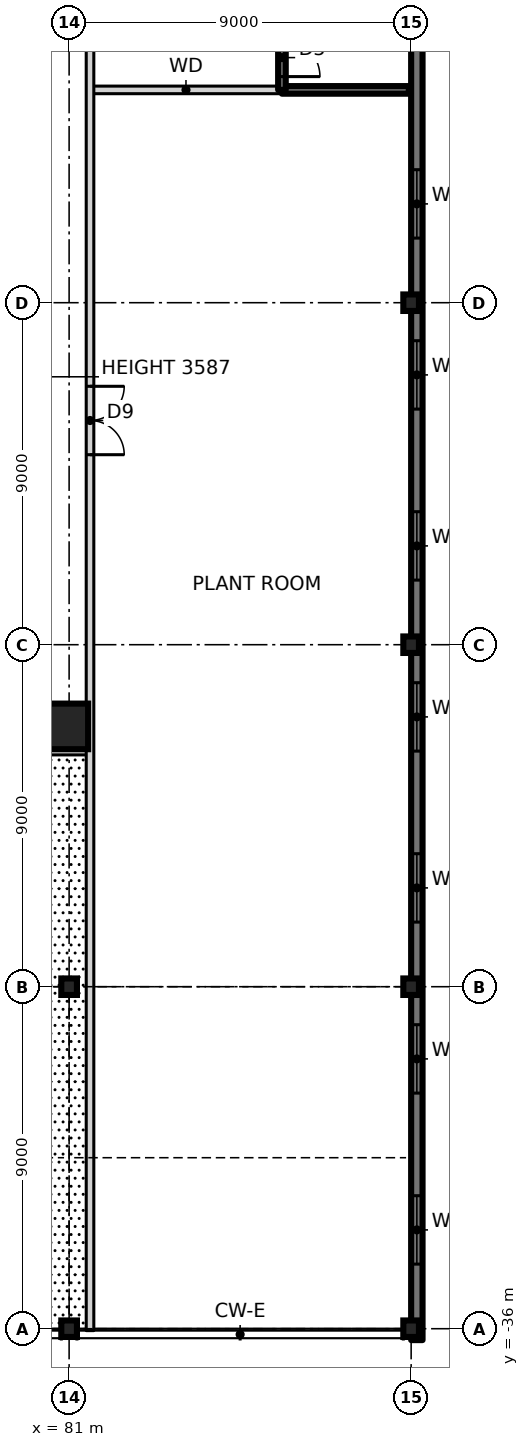
"""IFC4 building model, lengths in metres.
Left out: names, types, materials, properties, quantities, classifications, styles, units other than length and angle.
Written with IfcOpenShell. Run it as: python <this file> out.ifc"""

import sys

from ifc_helpers import new_model, si_unit, direction, frame, frame_2d, origin, origin_2d, place, context, subcontext, project, spatial, rectangle, hollow_rectangle, i_section, extrude, element, fill, save


model = new_model("IFC4")
c1 = context("Model", 3, precision=1e-05, world=origin(), true_north=direction((0.0, 1.0)))
c2 = subcontext(c1, "Body", "Model", "MODEL_VIEW")
j1 = project(units=[si_unit("LENGTHUNIT", "METRE"), si_unit("PLANEANGLEUNIT", "RADIAN")], contexts=[c1])
p1 = place(None, origin())
s1 = spatial("IfcSite", under=j1, at=p1, CompositionType="ELEMENT")
p2 = place(p1, origin())
s2 = spatial("IfcBuilding", under=s1, at=p2, CompositionType="ELEMENT")
p3 = place(p2, frame((0.0, 0.0, 10.5)))
s3 = spatial("IfcBuildingStorey", under=s2, at=p3, CompositionType="ELEMENT", Elevation=10.5)
p4 = place(p3, frame((80.9, -20.15, 0.0), z_axis=(0.0, 0.0, 1.0), x_axis=(1.0, 0.0, 0.0)))
e1 = element("IfcColumn", 1, at=p4, inside=s3, PredefinedType="COLUMN", context=c2, shape_type="SweptSolid", body=[
    extrude(hollow_rectangle(XDim=1.2, YDim=1.2, WallThickness=0.07, at=origin_2d()), origin(), (0.0, 0.0, 1.0), 4.5),
])
for number, where, z_axis, x_axis in (
    (2, (81.0, -36.0, 0.0), (0.0, 0.0, 1.0), (1.0, 0.0, 0.0)),
    (3, (81.0, -27.0, 0.0), (0.0, 0.0, 1.0), (1.0, 0.0, 0.0)),
    (4, (90.0, -36.0, 0.0), (0.0, 0.0, 1.0), (1.0, 0.0, 0.0)),
    (5, (90.0, -27.0, 0.0), (0.0, 0.0, 1.0), (1.0, 0.0, 0.0)),
    (6, (90.0, -18.0, 0.0), (0.0, 0.0, 1.0), (1.0, 0.0, 0.0)),
    (7, (90.0, -9.0, 0.0), (0.0, 0.0, 1.0), (1.0, 0.0, 0.0)),
):
    element("IfcColumn", number, at=place(p3, frame(where, z_axis=z_axis, x_axis=x_axis)), inside=s3, PredefinedType="COLUMN", context=c2, shape_type="SweptSolid", body=[
        extrude(i_section(OverallWidth=0.411, OverallDepth=0.434, WebThickness=0.036, FlangeThickness=0.057, at=origin_2d()), origin(), (0.0, 0.0, 1.0), 4.5),
    ])
p5 = place(p3, frame((90.15, -36.3, -0.25), z_axis=(0.0, 0.0, 1.0), x_axis=(0.0, 1.0, 0.0)))
e8 = element("IfcWall", 8, at=p5, inside=s3, PredefinedType="SOLIDWALL", context=c2, shape_type="SweptSolid", body=[
    extrude(rectangle(XDim=72.6, YDim=0.3, at=frame_2d((36.3, 0.0))), origin(), (0.0, 0.0, 1.0), 4.75),
])
p6 = place(p5, frame((2.0, 0.0, 1.15)))
e9 = element("IfcOpeningElement", 9, at=p6, cuts=e8, PredefinedType="OPENING", context=c2, shape_type="SweptSolid", body=[
    extrude(rectangle(XDim=1.8, YDim=2.4, at=frame_2d((0.9, 1.2))), frame((0.0, 0.16, 0.0), z_axis=(0.0, -1.0, 0.0), x_axis=(1.0, 0.0, 0.0)), (0.0, 0.0, 1.0), 0.32),
])
p7 = place(p5, frame((6.5, 0.0, 1.15)))
e10 = element("IfcOpeningElement", 10, at=p7, cuts=e8, PredefinedType="OPENING", context=c2, shape_type="SweptSolid", body=[
    extrude(rectangle(XDim=1.8, YDim=2.4, at=frame_2d((0.9, 1.2))), frame((0.0, 0.16, 0.0), z_axis=(0.0, -1.0, 0.0), x_axis=(1.0, 0.0, 0.0)), (0.0, 0.0, 1.0), 0.32),
])
p8 = place(p5, frame((11.0, 0.0, 1.15)))
e11 = element("IfcOpeningElement", 11, at=p8, cuts=e8, PredefinedType="OPENING", context=c2, shape_type="SweptSolid", body=[
    extrude(rectangle(XDim=1.8, YDim=2.4, at=frame_2d((0.9, 1.2))), frame((0.0, 0.16, 0.0), z_axis=(0.0, -1.0, 0.0), x_axis=(1.0, 0.0, 0.0)), (0.0, 0.0, 1.0), 0.32),
])
p9 = place(p5, frame((15.5, 0.0, 1.15)))
e12 = element("IfcOpeningElement", 12, at=p9, cuts=e8, PredefinedType="OPENING", context=c2, shape_type="SweptSolid", body=[
    extrude(rectangle(XDim=1.8, YDim=2.4, at=frame_2d((0.9, 1.2))), frame((0.0, 0.16, 0.0), z_axis=(0.0, -1.0, 0.0), x_axis=(1.0, 0.0, 0.0)), (0.0, 0.0, 1.0), 0.32),
])
p10 = place(p5, frame((20.0, 0.0, 1.15)))
e13 = element("IfcOpeningElement", 13, at=p10, cuts=e8, PredefinedType="OPENING", context=c2, shape_type="SweptSolid", body=[
    extrude(rectangle(XDim=1.8, YDim=2.4, at=frame_2d((0.9, 1.2))), frame((0.0, 0.16, 0.0), z_axis=(0.0, -1.0, 0.0), x_axis=(1.0, 0.0, 0.0)), (0.0, 0.0, 1.0), 0.32),
])
p11 = place(p5, frame((24.5, 0.0, 1.15)))
e14 = element("IfcOpeningElement", 14, at=p11, cuts=e8, PredefinedType="OPENING", context=c2, shape_type="SweptSolid", body=[
    extrude(rectangle(XDim=1.8, YDim=2.4, at=frame_2d((0.9, 1.2))), frame((0.0, 0.16, 0.0), z_axis=(0.0, -1.0, 0.0), x_axis=(1.0, 0.0, 0.0)), (0.0, 0.0, 1.0), 0.32),
])
p12 = place(p5, frame((29.0, 0.0, 1.15)))
e15 = element("IfcOpeningElement", 15, at=p12, cuts=e8, PredefinedType="OPENING", context=c2, shape_type="SweptSolid", body=[
    extrude(rectangle(XDim=1.8, YDim=2.4, at=frame_2d((0.9, 1.2))), frame((0.0, 0.16, 0.0), z_axis=(0.0, -1.0, 0.0), x_axis=(1.0, 0.0, 0.0)), (0.0, 0.0, 1.0), 0.32),
])
p13 = place(p5, frame((42.5, 0.0, 1.15)))
e16 = element("IfcOpeningElement", 16, at=p13, cuts=e8, PredefinedType="OPENING", context=c2, shape_type="SweptSolid", body=[
    extrude(rectangle(XDim=1.8, YDim=2.4, at=frame_2d((0.9, 1.2))), frame((0.0, 0.16, 0.0), z_axis=(0.0, -1.0, 0.0), x_axis=(1.0, 0.0, 0.0)), (0.0, 0.0, 1.0), 0.32),
])
p14 = place(p5, frame((47.0, 0.0, 1.15)))
e17 = element("IfcOpeningElement", 17, at=p14, cuts=e8, PredefinedType="OPENING", context=c2, shape_type="SweptSolid", body=[
    extrude(rectangle(XDim=1.8, YDim=2.4, at=frame_2d((0.9, 1.2))), frame((0.0, 0.16, 0.0), z_axis=(0.0, -1.0, 0.0), x_axis=(1.0, 0.0, 0.0)), (0.0, 0.0, 1.0), 0.32),
])
p15 = place(p5, frame((51.5, 0.0, 1.15)))
e18 = element("IfcOpeningElement", 18, at=p15, cuts=e8, PredefinedType="OPENING", context=c2, shape_type="SweptSolid", body=[
    extrude(rectangle(XDim=1.8, YDim=2.4, at=frame_2d((0.9, 1.2))), frame((0.0, 0.16, 0.0), z_axis=(0.0, -1.0, 0.0), x_axis=(1.0, 0.0, 0.0)), (0.0, 0.0, 1.0), 0.32),
])
p16 = place(p5, frame((56.0, 0.0, 1.15)))
e19 = element("IfcOpeningElement", 19, at=p16, cuts=e8, PredefinedType="OPENING", context=c2, shape_type="SweptSolid", body=[
    extrude(rectangle(XDim=1.8, YDim=2.4, at=frame_2d((0.9, 1.2))), frame((0.0, 0.16, 0.0), z_axis=(0.0, -1.0, 0.0), x_axis=(1.0, 0.0, 0.0)), (0.0, 0.0, 1.0), 0.32),
])
p17 = place(p5, frame((60.5, 0.0, 1.15)))
e20 = element("IfcOpeningElement", 20, at=p17, cuts=e8, PredefinedType="OPENING", context=c2, shape_type="SweptSolid", body=[
    extrude(rectangle(XDim=1.8, YDim=2.4, at=frame_2d((0.9, 1.2))), frame((0.0, 0.16, 0.0), z_axis=(0.0, -1.0, 0.0), x_axis=(1.0, 0.0, 0.0)), (0.0, 0.0, 1.0), 0.32),
])
p18 = place(p5, frame((65.0, 0.0, 1.15)))
e21 = element("IfcOpeningElement", 21, at=p18, cuts=e8, PredefinedType="OPENING", context=c2, shape_type="SweptSolid", body=[
    extrude(rectangle(XDim=1.8, YDim=2.4, at=frame_2d((0.9, 1.2))), frame((0.0, 0.16, 0.0), z_axis=(0.0, -1.0, 0.0), x_axis=(1.0, 0.0, 0.0)), (0.0, 0.0, 1.0), 0.32),
])
p19 = place(p5, frame((69.5, 0.0, 1.15)))
e22 = element("IfcOpeningElement", 22, at=p19, cuts=e8, PredefinedType="OPENING", context=c2, shape_type="SweptSolid", body=[
    extrude(rectangle(XDim=1.8, YDim=2.4, at=frame_2d((0.9, 1.2))), frame((0.0, 0.16, 0.0), z_axis=(0.0, -1.0, 0.0), x_axis=(1.0, 0.0, 0.0)), (0.0, 0.0, 1.0), 0.32),
])
p20 = place(p3, frame((44.45, -20.8, 0.0), z_axis=(0.0, 0.0, 1.0), x_axis=(1.0, 0.0, 0.0)))
e23 = element("IfcWall", 23, at=p20, inside=s3, PredefinedType="SOLIDWALL", context=c2, shape_type="SweptSolid", body=[
    extrude(rectangle(XDim=37.1, YDim=0.2, at=frame_2d((18.55, 0.0))), origin(), (0.0, 0.0, 1.0), 4.25),
])
p21 = place(p20, frame((3.325, 0.0, 0.0)))
e24 = element("IfcOpeningElement", 24, at=p21, cuts=e23, PredefinedType="OPENING", context=c2, shape_type="SweptSolid", body=[
    extrude(rectangle(XDim=1.8, YDim=2.1, at=frame_2d((0.9, 1.05))), frame((0.0, 0.11, 0.0), z_axis=(0.0, -1.0, 0.0), x_axis=(1.0, 0.0, 0.0)), (0.0, 0.0, 1.0), 0.22),
])
p22 = place(p20, frame((26.625, 0.0, 0.0)))
e25 = element("IfcOpeningElement", 25, at=p22, cuts=e23, PredefinedType="OPENING", context=c2, shape_type="SweptSolid", body=[
    extrude(rectangle(XDim=1.8, YDim=2.1, at=frame_2d((0.9, 1.05))), frame((0.0, 0.11, 0.0), z_axis=(0.0, -1.0, 0.0), x_axis=(1.0, 0.0, 0.0)), (0.0, 0.0, 1.0), 0.22),
])
p23 = place(p20, frame((8.65, 0.0, 0.0)))
e26 = element("IfcOpeningElement", 26, at=p23, cuts=e23, PredefinedType="OPENING", context=c2, shape_type="SweptSolid", body=[
    extrude(rectangle(XDim=1.8, YDim=2.1, at=frame_2d((0.9, 1.05))), frame((0.0, 0.11, 0.0), z_axis=(0.0, -1.0, 0.0), x_axis=(1.0, 0.0, 0.0)), (0.0, 0.0, 1.0), 0.22),
])
p24 = place(p3, frame((81.55, -3.4, 0.0), z_axis=(0.0, 0.0, 1.0), x_axis=(1.0, 0.0, 0.0)))
e27 = element("IfcWall", 27, at=p24, inside=s3, PredefinedType="SOLIDWALL", context=c2, shape_type="SweptSolid", body=[
    extrude(rectangle(XDim=5.05, YDim=0.2, at=frame_2d((2.525, 0.0))), origin(), (0.0, 0.0, 1.0), 4.25),
])
p25 = place(p3, frame((86.6, -3.4, 0.0), z_axis=(0.0, 0.0, 1.0), x_axis=(1.0, 0.0, 0.0)))
e28 = element("IfcWall", 28, at=p25, inside=s3, PredefinedType="SOLIDWALL", context=c2, shape_type="SweptSolid", body=[
    extrude(rectangle(XDim=3.34, YDim=0.2, at=frame_2d((1.67, 0.0))), origin(), (0.0, 0.0, 1.0), 4.5),
])
p26 = place(p3, frame((86.6, -3.4, 0.0), z_axis=(0.0, 0.0, 1.0), x_axis=(0.0, 1.0, 0.0)))
e29 = element("IfcWall", 29, at=p26, inside=s3, PredefinedType="SOLIDWALL", context=c2, shape_type="SweptSolid", body=[
    extrude(rectangle(XDim=7.4, YDim=0.2, at=frame_2d((3.7, 0.0))), origin(), (0.0, 0.0, 1.0), 4.5),
])
p27 = place(p26, frame((0.35, 0.0, 0.0)))
e30 = element("IfcOpeningElement", 30, at=p27, cuts=e29, PredefinedType="OPENING", context=c2, shape_type="SweptSolid", body=[
    extrude(rectangle(XDim=1.0, YDim=2.1, at=frame_2d((0.5, 1.05))), frame((0.0, 0.11, 0.0), z_axis=(0.0, -1.0, 0.0), x_axis=(1.0, 0.0, 0.0)), (0.0, 0.0, 1.0), 0.22),
])
p28 = place(p3, frame((81.55, -36.05, 0.0), z_axis=(0.0, 0.0, 1.0), x_axis=(0.0, 1.0, 0.0)))
e31 = element("IfcWall", 31, at=p28, inside=s3, PredefinedType="SOLIDWALL", context=c2, shape_type="SweptSolid", body=[
    extrude(rectangle(XDim=72.1, YDim=0.2, at=frame_2d((36.05, 0.0))), origin(), (0.0, 0.0, 1.0), 4.25),
])
p29 = place(p28, frame((66.65, 0.0, 0.0)))
e32 = element("IfcOpeningElement", 32, at=p29, cuts=e31, PredefinedType="OPENING", context=c2, shape_type="SweptSolid", body=[
    extrude(rectangle(XDim=1.8, YDim=2.1, at=frame_2d((0.9, 1.05))), frame((0.0, 0.11, 0.0), z_axis=(0.0, -1.0, 0.0), x_axis=(1.0, 0.0, 0.0)), (0.0, 0.0, 1.0), 0.22),
])
p30 = place(p28, frame((23.05, 0.0, 0.0)))
e33 = element("IfcOpeningElement", 33, at=p30, cuts=e31, PredefinedType="OPENING", context=c2, shape_type="SweptSolid", body=[
    extrude(rectangle(XDim=1.8, YDim=2.1, at=frame_2d((0.9, 1.05))), frame((0.0, 0.11, 0.0), z_axis=(0.0, -1.0, 0.0), x_axis=(1.0, 0.0, 0.0)), (0.0, 0.0, 1.0), 0.22),
])
p31 = place(p28, frame((35.45, 0.0, 0.0)))
e34 = element("IfcOpeningElement", 34, at=p31, cuts=e31, PredefinedType="OPENING", context=c2, shape_type="SweptSolid", body=[
    extrude(rectangle(XDim=1.8, YDim=2.1, at=frame_2d((0.9, 1.05))), frame((0.0, 0.11, 0.0), z_axis=(0.0, -1.0, 0.0), x_axis=(1.0, 0.0, 0.0)), (0.0, 0.0, 1.0), 0.22),
])
p32 = place(p28, frame((47.55, 0.0, 0.0)))
e35 = element("IfcOpeningElement", 35, at=p32, cuts=e31, PredefinedType="OPENING", context=c2, shape_type="SweptSolid", body=[
    extrude(rectangle(XDim=1.8, YDim=2.1, at=frame_2d((0.9, 1.05))), frame((0.0, 0.11, 0.0), z_axis=(0.0, -1.0, 0.0), x_axis=(1.0, 0.0, 0.0)), (0.0, 0.0, 1.0), 0.22),
])
p33 = place(p6, origin())
e36 = element("IfcWindow", 36, at=p33, inside=s3, PartitioningType="SINGLE_PANEL", PredefinedType="WINDOW", context=c2, shape_type="SweptSolid", body=[
    extrude(rectangle(XDim=1.8, YDim=2.4, at=frame_2d((0.9, 1.2))), frame((0.0, 0.03, 0.0), z_axis=(0.0, -1.0, 0.0), x_axis=(1.0, 0.0, 0.0)), (0.0, 0.0, 1.0), 0.06),
])
fill(e9, e36)
p34 = place(p7, origin())
e37 = element("IfcWindow", 37, at=p34, inside=s3, PartitioningType="SINGLE_PANEL", PredefinedType="WINDOW", context=c2, shape_type="SweptSolid", body=[
    extrude(rectangle(XDim=1.8, YDim=2.4, at=frame_2d((0.9, 1.2))), frame((0.0, 0.03, 0.0), z_axis=(0.0, -1.0, 0.0), x_axis=(1.0, 0.0, 0.0)), (0.0, 0.0, 1.0), 0.06),
])
fill(e10, e37)
p35 = place(p8, origin())
e38 = element("IfcWindow", 38, at=p35, inside=s3, PartitioningType="SINGLE_PANEL", PredefinedType="WINDOW", context=c2, shape_type="SweptSolid", body=[
    extrude(rectangle(XDim=1.8, YDim=2.4, at=frame_2d((0.9, 1.2))), frame((0.0, 0.03, 0.0), z_axis=(0.0, -1.0, 0.0), x_axis=(1.0, 0.0, 0.0)), (0.0, 0.0, 1.0), 0.06),
])
fill(e11, e38)
p36 = place(p9, origin())
e39 = element("IfcWindow", 39, at=p36, inside=s3, PartitioningType="SINGLE_PANEL", PredefinedType="WINDOW", context=c2, shape_type="SweptSolid", body=[
    extrude(rectangle(XDim=1.8, YDim=2.4, at=frame_2d((0.9, 1.2))), frame((0.0, 0.03, 0.0), z_axis=(0.0, -1.0, 0.0), x_axis=(1.0, 0.0, 0.0)), (0.0, 0.0, 1.0), 0.06),
])
fill(e12, e39)
p37 = place(p10, origin())
e40 = element("IfcWindow", 40, at=p37, inside=s3, PartitioningType="SINGLE_PANEL", PredefinedType="WINDOW", context=c2, shape_type="SweptSolid", body=[
    extrude(rectangle(XDim=1.8, YDim=2.4, at=frame_2d((0.9, 1.2))), frame((0.0, 0.03, 0.0), z_axis=(0.0, -1.0, 0.0), x_axis=(1.0, 0.0, 0.0)), (0.0, 0.0, 1.0), 0.06),
])
fill(e13, e40)
p38 = place(p11, origin())
e41 = element("IfcWindow", 41, at=p38, inside=s3, PartitioningType="SINGLE_PANEL", PredefinedType="WINDOW", context=c2, shape_type="SweptSolid", body=[
    extrude(rectangle(XDim=1.8, YDim=2.4, at=frame_2d((0.9, 1.2))), frame((0.0, 0.03, 0.0), z_axis=(0.0, -1.0, 0.0), x_axis=(1.0, 0.0, 0.0)), (0.0, 0.0, 1.0), 0.06),
])
fill(e14, e41)
p39 = place(p12, origin())
e42 = element("IfcWindow", 42, at=p39, inside=s3, PartitioningType="SINGLE_PANEL", PredefinedType="WINDOW", context=c2, shape_type="SweptSolid", body=[
    extrude(rectangle(XDim=1.8, YDim=2.4, at=frame_2d((0.9, 1.2))), frame((0.0, 0.03, 0.0), z_axis=(0.0, -1.0, 0.0), x_axis=(1.0, 0.0, 0.0)), (0.0, 0.0, 1.0), 0.06),
])
fill(e15, e42)
p40 = place(p30, frame((1.8, 0.0, 0.0), z_axis=(0.0, 0.0, 1.0), x_axis=(-1.0, 0.0, 0.0)))
e43 = element("IfcDoor", 43, at=p40, inside=s3, OperationType="DOUBLE_DOOR_SINGLE_SWING", PredefinedType="DOOR", context=c2, shape_type="SweptSolid", body=[
    extrude(rectangle(XDim=1.8, YDim=2.1, at=frame_2d((0.9, 1.05))), frame((0.0, 0.025, 0.0), z_axis=(0.0, -1.0, 0.0), x_axis=(1.0, 0.0, 0.0)), (0.0, 0.0, 1.0), 0.05),
])
fill(e33, e43)
p41 = place(p27, frame((1.0, 0.0, 0.0), z_axis=(0.0, 0.0, 1.0), x_axis=(-1.0, 0.0, 0.0)))
e44 = element("IfcDoor", 44, at=p41, inside=s3, OperationType="SINGLE_SWING_RIGHT", PredefinedType="DOOR", context=c2, shape_type="SweptSolid", body=[
    extrude(rectangle(XDim=1.0, YDim=2.1, at=frame_2d((0.5, 1.05))), frame((0.0, 0.025, 0.0), z_axis=(0.0, -1.0, 0.0), x_axis=(1.0, 0.0, 0.0)), (0.0, 0.0, 1.0), 0.05),
])
fill(e30, e44)
save(model, sys.argv[1])
